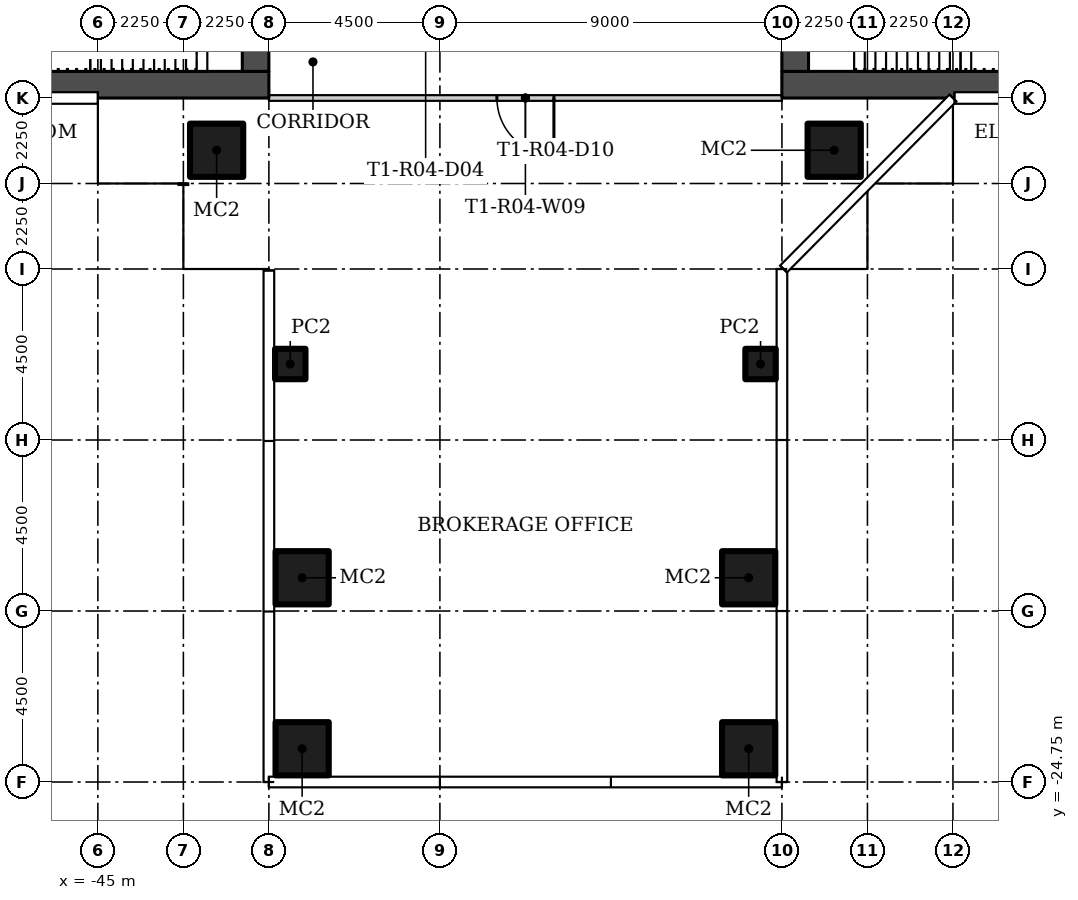
"""IFC4 building model, lengths in metres.
Left out: names, types, materials, properties, quantities, classifications, styles, units other than length and angle.
Written with IfcOpenShell. Run it as: python <this file> out.ifc"""

import sys

from ifc_helpers import new_model, si_unit, direction, frame, frame_2d, origin, origin_2d, place, context, subcontext, project, spatial, rectangle, hollow_rectangle, extrude, element, fill, save


model = new_model("IFC4")
c1 = context("Model", 3, precision=1e-05, world=origin(), true_north=direction((0.0, 1.0)))
c2 = subcontext(c1, "Body", "Model", "MODEL_VIEW")
j1 = project(units=[si_unit("LENGTHUNIT", "METRE"), si_unit("PLANEANGLEUNIT", "RADIAN")], contexts=[c1])
p1 = place(None, origin())
s1 = spatial("IfcSite", under=j1, at=p1, CompositionType="ELEMENT")
p2 = place(p1, origin())
s2 = spatial("IfcBuilding", under=s1, at=p2, CompositionType="ELEMENT")
p3 = place(p2, frame((0.0, 0.0, 49.8)))
s3 = spatial("IfcBuildingStorey", under=s2, at=p3, CompositionType="ELEMENT", Elevation=49.8)
for number, where in (
    (1, (-25.625, -8.125, 0.0)),
    (2, (-41.875, -8.125, 0.0)),
):
    element("IfcColumn", number, at=place(p3, frame(where)), inside=s3, PredefinedType="COLUMN", context=c2, shape_type="SweptSolid", body=[
        extrude(hollow_rectangle(XDim=1.4, YDim=1.4, WallThickness=0.05, at=origin_2d()), origin(), (0.0, 0.0, 1.0), 3.55),
    ])
p4 = place(p3, frame((-39.938, -13.75, 0.0)))
e3 = element("IfcColumn", 3, at=p4, inside=s3, PredefinedType="COLUMN", context=c2, shape_type="SweptSolid", body=[
    extrude(hollow_rectangle(XDim=0.8, YDim=0.8, WallThickness=0.025, at=origin_2d()), origin(), (0.0, 0.0, 1.0), 3.55),
])
for number, where in (
    (4, (-39.625, -19.375, 0.0)),
    (5, (-39.625, -23.875, 0.0)),
):
    element("IfcColumn", number, at=place(p3, frame(where)), inside=s3, PredefinedType="COLUMN", context=c2, shape_type="SweptSolid", body=[
        extrude(hollow_rectangle(XDim=1.4, YDim=1.4, WallThickness=0.05, at=origin_2d()), origin(), (0.0, 0.0, 1.0), 3.55),
    ])
p5 = place(p3, frame((-27.562, -13.75, 0.0)))
e6 = element("IfcColumn", 6, at=p5, inside=s3, PredefinedType="COLUMN", context=c2, shape_type="SweptSolid", body=[
    extrude(hollow_rectangle(XDim=0.8, YDim=0.8, WallThickness=0.025, at=origin_2d()), origin(), (0.0, 0.0, 1.0), 3.55),
])
for number, where in (
    (7, (-27.875, -19.375, 0.0)),
    (8, (-27.875, -23.875, 0.0)),
):
    element("IfcColumn", number, at=place(p3, frame(where)), inside=s3, PredefinedType="COLUMN", context=c2, shape_type="SweptSolid", body=[
        extrude(hollow_rectangle(XDim=1.4, YDim=1.4, WallThickness=0.05, at=origin_2d()), origin(), (0.0, 0.0, 1.0), 3.55),
    ])
p6 = place(p3, frame((-27.0, -6.75, 0.0), z_axis=(0.0, 0.0, 1.0), x_axis=(-1.0, 0.0, 0.0)))
e9 = element("IfcWall", 9, at=p6, inside=s3, PredefinedType="PARTITIONING", context=c2, shape_type="SweptSolid", body=[
    extrude(rectangle(XDim=13.5, YDim=0.15, at=frame_2d((6.75, 0.0))), origin(), (0.0, 0.0, 1.0), 3.55),
])
p7 = place(p6, frame((6.0, 0.0, 0.0)))
e10 = element("IfcOpeningElement", 10, at=p7, cuts=e9, PredefinedType="OPENING", context=c2, shape_type="SweptSolid", body=[
    extrude(rectangle(XDim=1.5, YDim=2.1, at=frame_2d((0.75, 1.05))), frame((0.0, 0.085, 0.0), z_axis=(0.0, -1.0, 0.0), x_axis=(1.0, 0.0, 0.0)), (0.0, 0.0, 1.0), 0.17),
])
p8 = place(p3, frame((-27.0, -6.4, 0.0)))
e11 = element("IfcWall", 11, at=p8, inside=s3, PredefinedType="SHEAR", context=c2, shape_type="SweptSolid", body=[
    extrude(rectangle(XDim=13.5, YDim=0.7, at=frame_2d((6.75, 0.0))), origin(), (0.0, 0.0, 1.0), 3.55),
])
p9 = place(p3, frame((-26.65, 6.05, 0.0), z_axis=(0.0, 0.0, 1.0), x_axis=(0.0, -1.0, 0.0)))
e12 = element("IfcWall", 12, at=p9, inside=s3, PredefinedType="SHEAR", context=c2, shape_type="SweptSolid", body=[
    extrude(rectangle(XDim=12.1, YDim=0.7, at=frame_2d((6.05, 0.0))), origin(), (0.0, 0.0, 1.0), 3.55),
])
p10 = place(p9, frame((3.9, 0.0, 0.0)))
e13 = element("IfcOpeningElement", 13, at=p10, cuts=e12, PredefinedType="OPENING", context=c2, shape_type="SweptSolid", body=[
    extrude(rectangle(XDim=1.8, YDim=2.4, at=frame_2d((0.9, 1.2))), frame((0.0, 0.36, 0.0), z_axis=(0.0, -1.0, 0.0), x_axis=(1.0, 0.0, 0.0)), (0.0, 0.0, 1.0), 0.72),
])
p11 = place(p3, frame((-40.5, -6.4, 0.0), z_axis=(0.0, 0.0, 1.0), x_axis=(-1.0, 0.0, 0.0)))
e14 = element("IfcWall", 14, at=p11, inside=s3, PredefinedType="SHEAR", context=c2, shape_type="SweptSolid", body=[
    extrude(rectangle(XDim=13.5, YDim=0.7, at=frame_2d((6.75, 0.0))), origin(), (0.0, 0.0, 1.0), 3.55),
])
p12 = place(p3, frame((-40.85, -6.05, 0.0), z_axis=(0.0, 0.0, 1.0), x_axis=(0.0, 1.0, 0.0)))
e15 = element("IfcWall", 15, at=p12, inside=s3, PredefinedType="SHEAR", context=c2, shape_type="SweptSolid", body=[
    extrude(rectangle(XDim=12.1, YDim=0.7, at=frame_2d((6.05, 0.0))), origin(), (0.0, 0.0, 1.0), 3.55),
])
p13 = place(p12, frame((6.4, 0.0, 0.0)))
e16 = element("IfcOpeningElement", 16, at=p13, cuts=e15, PredefinedType="OPENING", context=c2, shape_type="SweptSolid", body=[
    extrude(rectangle(XDim=1.8, YDim=2.4, at=frame_2d((0.9, 1.2))), frame((0.0, 0.36, 0.0), z_axis=(0.0, -1.0, 0.0), x_axis=(1.0, 0.0, 0.0)), (0.0, 0.0, 1.0), 0.72),
])
p14 = place(p7, origin())
e17 = element("IfcDoor", 17, at=p14, inside=s3, OperationType="DOUBLE_DOOR_SINGLE_SWING", PredefinedType="DOOR", context=c2, shape_type="SweptSolid", body=[
    extrude(rectangle(XDim=1.5, YDim=2.1, at=frame_2d((0.75, 1.05))), frame((0.0, 0.025, 0.0), z_axis=(0.0, -1.0, 0.0), x_axis=(1.0, 0.0, 0.0)), (0.0, 0.0, 1.0), 0.05),
])
fill(e10, e17)
save(model, sys.argv[1])
